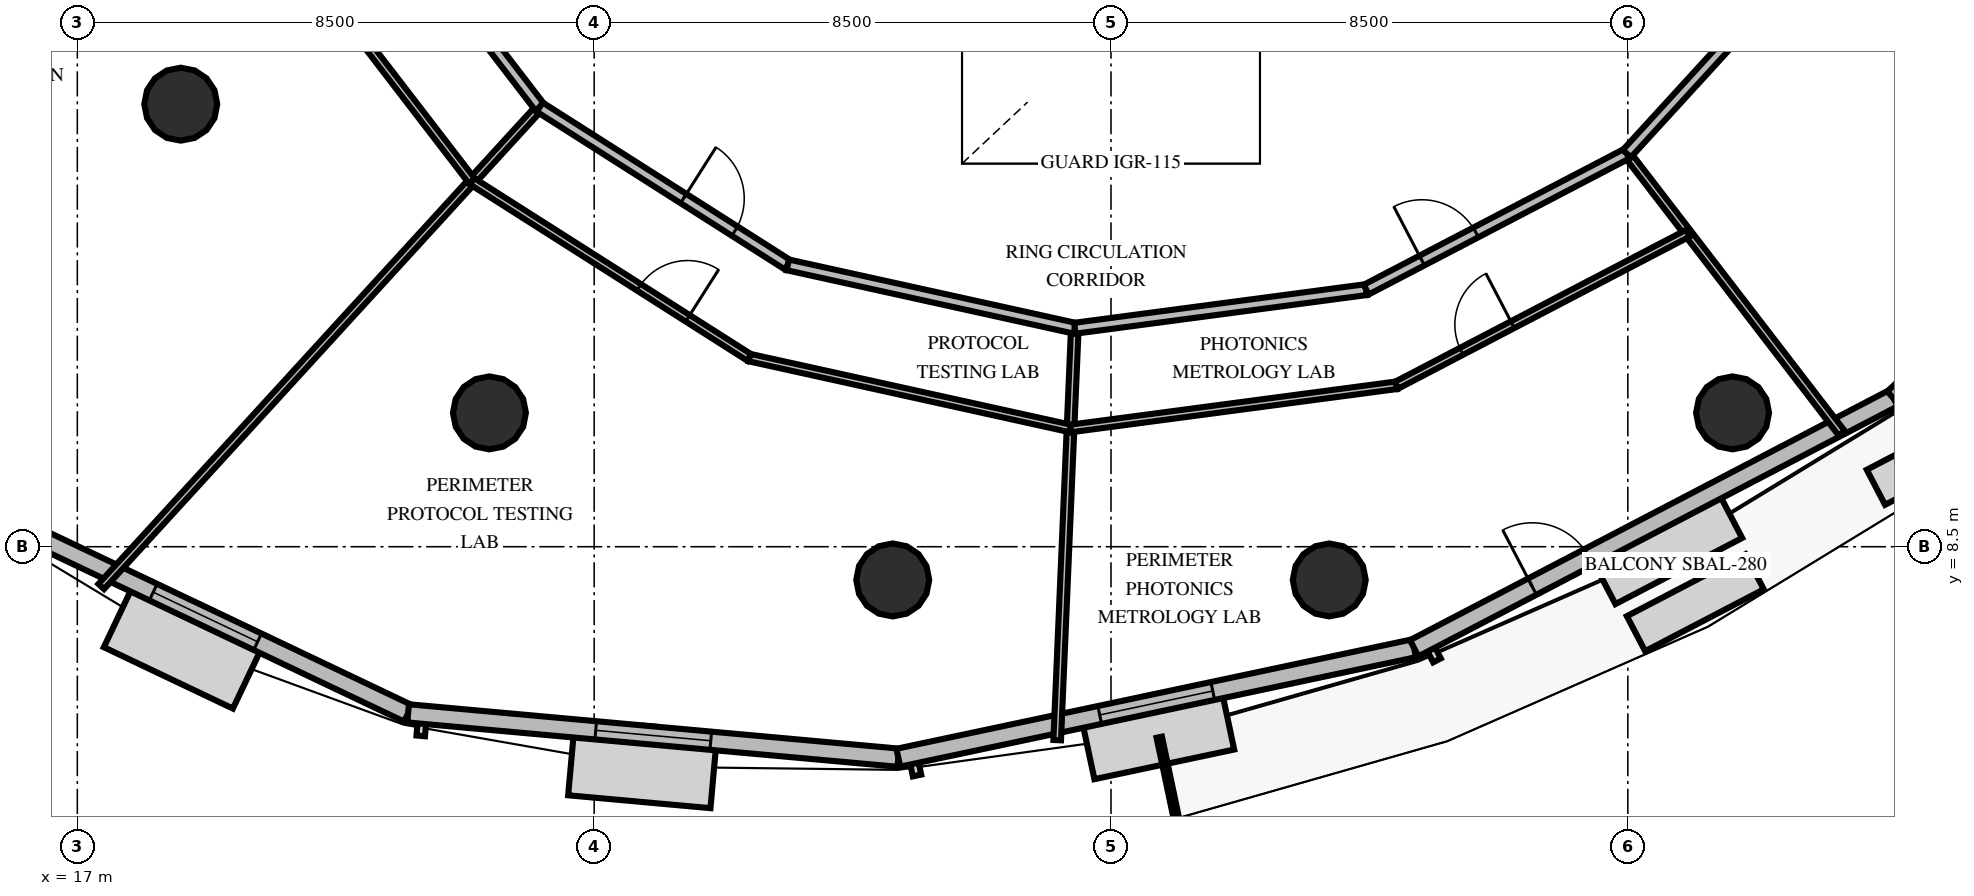
"""IFC4 building model, lengths in metres.
Left out: names, types, materials, properties, quantities, classifications, styles, units other than length and angle.
Written with IfcOpenShell. Run it as: python <this file> out.ifc"""

import sys

from ifc_helpers import new_model, si_unit, direction, frame, frame_2d, origin, origin_2d, place, context, subcontext, project, spatial, rectangle, circle, extrude, element, fill, save


model = new_model("IFC4")
c1 = context("Model", 3, precision=1e-05, world=origin(), true_north=direction((0.0, 1.0)))
c2 = subcontext(c1, "Body", "Model", "MODEL_VIEW")
j1 = project(units=[si_unit("LENGTHUNIT", "METRE"), si_unit("PLANEANGLEUNIT", "RADIAN")], contexts=[c1])
p1 = place(None, origin())
s1 = spatial("IfcSite", under=j1, at=p1, CompositionType="ELEMENT")
p2 = place(p1, origin())
s2 = spatial("IfcBuilding", under=s1, at=p2, CompositionType="ELEMENT")
p3 = place(p2, frame((0.0, 0.0, 149.8)))
s3 = spatial("IfcBuildingStorey", under=s2, at=p3, CompositionType="ELEMENT", Elevation=149.8)
for number, where, z_axis, x_axis in (
    (1, (18.701, 15.778, 0.0), (0.0, 0.0, 1.0), (1.0, 0.0, 0.0)),
    (2, (23.778, 10.701, 0.0), (0.0, 0.0, 1.0), (1.0, 0.0, 0.0)),
    (3, (30.41, 7.954, 0.0), (0.0, 0.0, 1.0), (1.0, 0.0, 0.0)),
    (4, (37.59, 7.954, 0.0), (0.0, 0.0, 1.0), (1.0, 0.0, 0.0)),
    (5, (44.222, 10.701, 0.0), (0.0, 0.0, 1.0), (1.0, 0.0, 0.0)),
):
    element("IfcColumn", number, at=place(p3, frame(where, z_axis=z_axis, x_axis=x_axis)), inside=s3, PredefinedType="COLUMN", context=c2, shape_type="SweptSolid", body=[
        extrude(circle(Radius=0.6, at=origin_2d()), origin(), (0.0, 0.0, 1.0), 4.0),
    ])
p4 = place(p3, frame((15.772, 8.93, 0.0), z_axis=(0.0, 0.0, 1.0), x_axis=(0.90311340401, -0.429402118646, 0.0)))
e6 = element("IfcWall", 6, at=p4, inside=s3, PredefinedType="SOLIDWALL", context=c2, shape_type="SweptSolid", body=[
    extrude(rectangle(XDim=7.383, YDim=0.3, at=frame_2d((3.692, 0.0))), origin(), (0.0, 0.0, 1.0), 2.9),
])
p5 = place(p4, frame((2.742, 0.0, 0.8)))
e7 = element("IfcOpeningElement", 7, at=p5, cuts=e6, PredefinedType="OPENING", context=c2, shape_type="SweptSolid", body=[
    extrude(rectangle(XDim=1.9, YDim=1.95, at=frame_2d((0.95, 0.975))), frame((0.0, 0.16, 0.0), z_axis=(0.0, -1.0, 0.0), x_axis=(1.0, 0.0, 0.0)), (0.0, 0.0, 1.0), 0.32),
])
p6 = place(p3, frame((22.44, 5.76, 0.0), z_axis=(0.0, 0.0, 1.0), x_axis=(0.995933895162, -0.090087049387, 0.0)))
e8 = element("IfcWall", 8, at=p6, inside=s3, PredefinedType="SOLIDWALL", context=c2, shape_type="SweptSolid", body=[
    extrude(rectangle(XDim=8.095, YDim=0.3, at=frame_2d((4.047, 0.0))), origin(), (0.0, 0.0, 1.0), 2.9),
])
p7 = place(p6, frame((3.098, 0.0, 0.8)))
e9 = element("IfcOpeningElement", 9, at=p7, cuts=e8, PredefinedType="OPENING", context=c2, shape_type="SweptSolid", body=[
    extrude(rectangle(XDim=1.9, YDim=1.95, at=frame_2d((0.95, 0.975))), frame((0.0, 0.16, 0.0), z_axis=(0.0, -1.0, 0.0), x_axis=(1.0, 0.0, 0.0)), (0.0, 0.0, 1.0), 0.32),
])
p8 = place(p3, frame((30.502, 5.03, 0.0), z_axis=(0.0, 0.0, 1.0), x_axis=(0.978225120282, 0.207546655113, 0.0)))
e10 = element("IfcWall", 10, at=p8, inside=s3, PredefinedType="SOLIDWALL", context=c2, shape_type="SweptSolid", body=[
    extrude(rectangle(XDim=8.673, YDim=0.3, at=frame_2d((4.336, 0.0))), origin(), (0.0, 0.0, 1.0), 2.9),
])
p9 = place(p8, frame((3.386, 0.0, 0.8)))
e11 = element("IfcOpeningElement", 11, at=p9, cuts=e10, PredefinedType="OPENING", context=c2, shape_type="SweptSolid", body=[
    extrude(rectangle(XDim=1.9, YDim=1.95, at=frame_2d((0.95, 0.975))), frame((0.0, 0.16, 0.0), z_axis=(0.0, -1.0, 0.0), x_axis=(1.0, 0.0, 0.0)), (0.0, 0.0, 1.0), 0.32),
])
p10 = place(p3, frame((38.986, 6.83, 0.0), z_axis=(0.0, 0.0, 1.0), x_axis=(0.886600513761, 0.462535975897, 0.0)))
e12 = element("IfcWall", 12, at=p10, inside=s3, PredefinedType="SOLIDWALL", context=c2, shape_type="SweptSolid", body=[
    extrude(rectangle(XDim=8.891, YDim=0.3, at=frame_2d((4.445, 0.0))), origin(), (0.0, 0.0, 1.0), 2.9),
])
p11 = place(p10, frame((2.19, 0.0, 0.0)))
e13 = element("IfcOpeningElement", 13, at=p11, cuts=e12, PredefinedType="OPENING", context=c2, shape_type="SweptSolid", body=[
    extrude(rectangle(XDim=1.05, YDim=2.15, at=frame_2d((0.525, 1.075))), frame((0.0, 0.16, 0.0), z_axis=(0.0, -1.0, 0.0), x_axis=(1.0, 0.0, 0.0)), (0.0, 0.0, 1.0), 0.32),
])
p12 = place(p3, frame((46.869, 10.943, 0.0), z_axis=(0.0, 0.0, 1.0), x_axis=(0.729921586767, 0.683530889698, 0.0)))
e14 = element("IfcWall", 14, at=p12, inside=s3, PredefinedType="SOLIDWALL", context=c2, shape_type="SweptSolid", body=[
    extrude(rectangle(XDim=8.673, YDim=0.3, at=frame_2d((4.336, 0.0))), origin(), (0.0, 0.0, 1.0), 2.9),
])
p13 = place(p12, frame((3.386, 0.0, 0.8)))
e15 = element("IfcOpeningElement", 15, at=p13, cuts=e14, PredefinedType="OPENING", context=c2, shape_type="SweptSolid", body=[
    extrude(rectangle(XDim=1.9, YDim=1.95, at=frame_2d((0.95, 0.975))), frame((0.0, 0.16, 0.0), z_axis=(0.0, -1.0, 0.0), x_axis=(1.0, 0.0, 0.0)), (0.0, 0.0, 1.0), 0.32),
])
p14 = place(p3, frame((24.605, 15.729, 0.0), z_axis=(0.0, 0.0, 1.0), x_axis=(-0.674940942489, -0.737871753188, 0.0)))
e16 = element("IfcWall", 16, at=p14, inside=s3, PredefinedType="PARTITIONING", context=c2, shape_type="SweptSolid", body=[
    extrude(rectangle(XDim=10.684, YDim=0.125, at=frame_2d((5.342, 0.0))), origin(), (0.0, 0.0, 1.0), 2.8),
])
p15 = place(p3, frame((21.658, 19.562, 0.0), z_axis=(0.0, 0.0, 1.0), x_axis=(0.609452025555, -0.792822949054, 0.0)))
e17 = element("IfcWall", 17, at=p15, inside=s3, PredefinedType="PARTITIONING", context=c2, shape_type="SweptSolid", body=[
    extrude(rectangle(XDim=4.834, YDim=0.18, at=frame_2d((2.417, 0.0))), origin(), (0.0, 0.0, 1.0), 2.8),
])
p16 = place(p3, frame((20.196, 18.799, 0.0), z_axis=(0.0, 0.0, 1.0), x_axis=(0.609464175054, -0.792813609448, 0.0)))
e18 = element("IfcWall", 18, at=p16, inside=s3, PredefinedType="PARTITIONING", context=c2, shape_type="SweptSolid", body=[
    extrude(rectangle(XDim=5.407, YDim=0.125, at=frame_2d((2.704, 0.0))), origin(), (0.0, 0.0, 1.0), 2.8),
])
p17 = place(p3, frame((33.405, 12.093, 0.0), z_axis=(0.0, 0.0, 1.0), x_axis=(-0.042777788452, -0.999084611439, 0.0)))
e19 = element("IfcWall", 19, at=p17, inside=s3, PredefinedType="PARTITIONING", context=c2, shape_type="SweptSolid", body=[
    extrude(rectangle(XDim=6.78, YDim=0.125, at=frame_2d((3.39, 0.0))), origin(), (0.0, 0.0, 1.0), 2.8),
])
p18 = place(p3, frame((24.605, 15.729, 0.0), z_axis=(0.0, 0.0, 1.0), x_axis=(0.843858975669, -0.536565027916, 0.0)))
e20 = element("IfcWall", 20, at=p18, inside=s3, PredefinedType="PARTITIONING", context=c2, shape_type="SweptSolid", body=[
    extrude(rectangle(XDim=4.834, YDim=0.18, at=frame_2d((2.417, 0.0))), origin(), (0.0, 0.0, 1.0), 2.8),
])
p19 = place(p18, frame((2.801, 0.0, 0.0)))
e21 = element("IfcOpeningElement", 21, at=p19, cuts=e20, PredefinedType="OPENING", context=c2, shape_type="SweptSolid", body=[
    extrude(rectangle(XDim=1.0, YDim=2.15, at=frame_2d((0.5, 1.075))), frame((0.0, 0.1, 0.0), z_axis=(0.0, -1.0, 0.0), x_axis=(1.0, 0.0, 0.0)), (0.0, 0.0, 1.0), 0.2),
])
p20 = place(p3, frame((28.684, 13.135, 0.0), z_axis=(0.0, 0.0, 1.0), x_axis=(0.976484389615, -0.215588118498, 0.0)))
e22 = element("IfcWall", 22, at=p20, inside=s3, PredefinedType="PARTITIONING", context=c2, shape_type="SweptSolid", body=[
    extrude(rectangle(XDim=4.834, YDim=0.18, at=frame_2d((2.417, 0.0))), origin(), (0.0, 0.0, 1.0), 2.8),
])
p21 = place(p3, frame((23.491, 14.511, 0.0), z_axis=(0.0, 0.0, 1.0), x_axis=(0.843858498534, -0.536565778308, 0.0)))
e23 = element("IfcWall", 23, at=p21, inside=s3, PredefinedType="PARTITIONING", context=c2, shape_type="SweptSolid", body=[
    extrude(rectangle(XDim=5.407, YDim=0.125, at=frame_2d((2.704, 0.0))), origin(), (0.0, 0.0, 1.0), 2.8),
])
p22 = place(p21, frame((3.253, 0.0, 0.0)))
e24 = element("IfcOpeningElement", 24, at=p22, cuts=e23, PredefinedType="OPENING", context=c2, shape_type="SweptSolid", body=[
    extrude(rectangle(XDim=0.95, YDim=2.15, at=frame_2d((0.475, 1.075))), frame((0.0, 0.073, 0.0), z_axis=(0.0, -1.0, 0.0), x_axis=(1.0, 0.0, 0.0)), (0.0, 0.0, 1.0), 0.145),
])
p23 = place(p3, frame((28.054, 11.61, 0.0), z_axis=(0.0, 0.0, 1.0), x_axis=(0.976475145599, -0.215629984066, 0.0)))
e25 = element("IfcWall", 25, at=p23, inside=s3, PredefinedType="PARTITIONING", context=c2, shape_type="SweptSolid", body=[
    extrude(rectangle(XDim=5.407, YDim=0.125, at=frame_2d((2.704, 0.0))), origin(), (0.0, 0.0, 1.0), 2.8),
])
p24 = place(p3, frame((42.484, 14.964, 0.0), z_axis=(0.0, 0.0, 1.0), x_axis=(0.609448463094, -0.792825687546, 0.0)))
e26 = element("IfcWall", 26, at=p24, inside=s3, PredefinedType="PARTITIONING", context=c2, shape_type="SweptSolid", body=[
    extrude(rectangle(XDim=5.803, YDim=0.125, at=frame_2d((2.902, 0.0))), origin(), (0.0, 0.0, 1.0), 2.8),
])
p25 = place(p3, frame((33.405, 12.093, 0.0), z_axis=(0.0, 0.0, 1.0), x_axis=(0.991335628385, 0.131353233287, 0.0)))
e27 = element("IfcWall", 27, at=p25, inside=s3, PredefinedType="PARTITIONING", context=c2, shape_type="SweptSolid", body=[
    extrude(rectangle(XDim=4.834, YDim=0.18, at=frame_2d((2.417, 0.0))), origin(), (0.0, 0.0, 1.0), 2.8),
])
p26 = place(p3, frame((38.198, 12.728, 0.0), z_axis=(0.0, 0.0, 1.0), x_axis=(0.886598352784, 0.462540118088, 0.0)))
e28 = element("IfcWall", 28, at=p26, inside=s3, PredefinedType="PARTITIONING", context=c2, shape_type="SweptSolid", body=[
    extrude(rectangle(XDim=4.834, YDim=0.18, at=frame_2d((2.417, 0.0))), origin(), (0.0, 0.0, 1.0), 2.8),
])
p27 = place(p26, frame((1.034, 0.0, 0.0)))
e29 = element("IfcOpeningElement", 29, at=p27, cuts=e28, PredefinedType="OPENING", context=c2, shape_type="SweptSolid", body=[
    extrude(rectangle(XDim=1.0, YDim=2.15, at=frame_2d((0.5, 1.075))), frame((0.0, 0.1, 0.0), z_axis=(0.0, -1.0, 0.0), x_axis=(1.0, 0.0, 0.0)), (0.0, 0.0, 1.0), 0.2),
])
p28 = place(p3, frame((33.334, 10.444, 0.0), z_axis=(0.0, 0.0, 1.0), x_axis=(0.991325030471, 0.131433192007, 0.0)))
e30 = element("IfcWall", 30, at=p28, inside=s3, PredefinedType="PARTITIONING", context=c2, shape_type="SweptSolid", body=[
    extrude(rectangle(XDim=5.407, YDim=0.125, at=frame_2d((2.704, 0.0))), origin(), (0.0, 0.0, 1.0), 2.8),
])
p29 = place(p3, frame((38.695, 11.155, 0.0), z_axis=(0.0, 0.0, 1.0), x_axis=(0.886620264439, 0.462498115333, 0.0)))
e31 = element("IfcWall", 31, at=p29, inside=s3, PredefinedType="PARTITIONING", context=c2, shape_type="SweptSolid", body=[
    extrude(rectangle(XDim=5.407, YDim=0.125, at=frame_2d((2.704, 0.0))), origin(), (0.0, 0.0, 1.0), 2.8),
])
p30 = place(p29, frame((1.204, 0.0, 0.0)))
e32 = element("IfcOpeningElement", 32, at=p30, cuts=e31, PredefinedType="OPENING", context=c2, shape_type="SweptSolid", body=[
    extrude(rectangle(XDim=0.95, YDim=2.15, at=frame_2d((0.475, 1.075))), frame((0.0, 0.073, 0.0), z_axis=(0.0, -1.0, 0.0), x_axis=(1.0, 0.0, 0.0)), (0.0, 0.0, 1.0), 0.145),
])
p31 = place(p3, frame((42.484, 14.964, 0.0), z_axis=(0.0, 0.0, 1.0), x_axis=(0.6749444404, 0.737868553587, 0.0)))
e33 = element("IfcWall", 33, at=p31, inside=s3, PredefinedType="PARTITIONING", context=c2, shape_type="SweptSolid", body=[
    extrude(rectangle(XDim=4.834, YDim=0.18, at=frame_2d((2.417, 0.0))), origin(), (0.0, 0.0, 1.0), 2.8),
])
p32 = place(p5, origin())
e34 = element("IfcWindow", 34, at=p32, inside=s3, PartitioningType="SINGLE_PANEL", PredefinedType="WINDOW", context=c2, shape_type="SweptSolid", body=[
    extrude(rectangle(XDim=1.9, YDim=1.95, at=frame_2d((0.95, 0.975))), frame((0.0, 0.03, 0.0), z_axis=(0.0, -1.0, 0.0), x_axis=(1.0, 0.0, 0.0)), (0.0, 0.0, 1.0), 0.06),
])
fill(e7, e34)
p33 = place(p7, origin())
e35 = element("IfcWindow", 35, at=p33, inside=s3, PartitioningType="SINGLE_PANEL", PredefinedType="WINDOW", context=c2, shape_type="SweptSolid", body=[
    extrude(rectangle(XDim=1.9, YDim=1.95, at=frame_2d((0.95, 0.975))), frame((0.0, 0.03, 0.0), z_axis=(0.0, -1.0, 0.0), x_axis=(1.0, 0.0, 0.0)), (0.0, 0.0, 1.0), 0.06),
])
fill(e9, e35)
p34 = place(p9, origin())
e36 = element("IfcWindow", 36, at=p34, inside=s3, PartitioningType="SINGLE_PANEL", PredefinedType="WINDOW", context=c2, shape_type="SweptSolid", body=[
    extrude(rectangle(XDim=1.9, YDim=1.95, at=frame_2d((0.95, 0.975))), frame((0.0, 0.03, 0.0), z_axis=(0.0, -1.0, 0.0), x_axis=(1.0, 0.0, 0.0)), (0.0, 0.0, 1.0), 0.06),
])
fill(e11, e36)
p35 = place(p11, origin())
e37 = element("IfcDoor", 37, at=p35, inside=s3, OperationType="SINGLE_SWING_LEFT", PredefinedType="DOOR", context=c2, shape_type="SweptSolid", body=[
    extrude(rectangle(XDim=1.05, YDim=2.15, at=frame_2d((0.525, 1.075))), frame((0.0, 0.025, 0.0), z_axis=(0.0, -1.0, 0.0), x_axis=(1.0, 0.0, 0.0)), (0.0, 0.0, 1.0), 0.05),
])
fill(e13, e37)
p36 = place(p19, origin())
e38 = element("IfcDoor", 38, at=p36, inside=s3, OperationType="SINGLE_SWING_LEFT", PredefinedType="DOOR", context=c2, shape_type="SweptSolid", body=[
    extrude(rectangle(XDim=1.0, YDim=2.15, at=frame_2d((0.5, 1.075))), frame((0.0, 0.025, 0.0), z_axis=(0.0, -1.0, 0.0), x_axis=(1.0, 0.0, 0.0)), (0.0, 0.0, 1.0), 0.05),
])
fill(e21, e38)
p37 = place(p22, origin())
e39 = element("IfcDoor", 39, at=p37, inside=s3, OperationType="SINGLE_SWING_RIGHT", PredefinedType="DOOR", context=c2, shape_type="SweptSolid", body=[
    extrude(rectangle(XDim=0.95, YDim=2.15, at=frame_2d((0.475, 1.075))), frame((0.0, 0.025, 0.0), z_axis=(0.0, -1.0, 0.0), x_axis=(1.0, 0.0, 0.0)), (0.0, 0.0, 1.0), 0.05),
])
fill(e24, e39)
p38 = place(p27, origin())
e40 = element("IfcDoor", 40, at=p38, inside=s3, OperationType="SINGLE_SWING_LEFT", PredefinedType="DOOR", context=c2, shape_type="SweptSolid", body=[
    extrude(rectangle(XDim=1.0, YDim=2.15, at=frame_2d((0.5, 1.075))), frame((0.0, 0.025, 0.0), z_axis=(0.0, -1.0, 0.0), x_axis=(1.0, 0.0, 0.0)), (0.0, 0.0, 1.0), 0.05),
])
fill(e29, e40)
p39 = place(p30, origin())
e41 = element("IfcDoor", 41, at=p39, inside=s3, OperationType="SINGLE_SWING_RIGHT", PredefinedType="DOOR", context=c2, shape_type="SweptSolid", body=[
    extrude(rectangle(XDim=0.95, YDim=2.15, at=frame_2d((0.475, 1.075))), frame((0.0, 0.025, 0.0), z_axis=(0.0, -1.0, 0.0), x_axis=(1.0, 0.0, 0.0)), (0.0, 0.0, 1.0), 0.05),
])
fill(e32, e41)
save(model, sys.argv[1])
